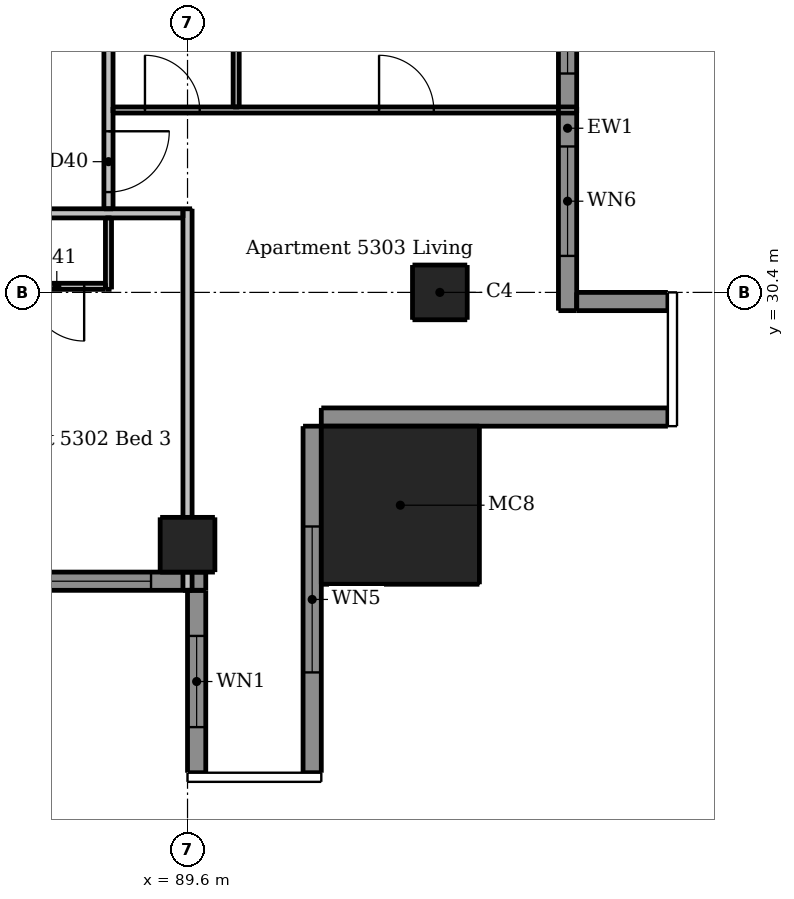
"""IFC4 building model, lengths in metres.
Left out: names, types, materials, properties, quantities, classifications, styles, units other than length and angle.
Written with IfcOpenShell. Run it as: python <this file> out.ifc"""

import sys

from ifc_helpers import new_model, si_unit, direction, frame, frame_2d, origin, origin_2d, place, context, subcontext, project, spatial, rectangle, extrude, element, fill, save


model = new_model("IFC4")
c1 = context("Model", 3, precision=1e-05, world=origin(), true_north=direction((0.0, 1.0)))
c2 = subcontext(c1, "Body", "Model", "MODEL_VIEW")
j1 = project(units=[si_unit("LENGTHUNIT", "METRE"), si_unit("PLANEANGLEUNIT", "RADIAN")], contexts=[c1])
p1 = place(None, origin())
s1 = spatial("IfcSite", under=j1, at=p1, CompositionType="ELEMENT")
p2 = place(p1, origin())
s2 = spatial("IfcBuilding", under=s1, at=p2, CompositionType="ELEMENT")
p3 = place(p2, frame((0.0, 0.0, 200.2)))
s3 = spatial("IfcBuildingStorey", under=s2, at=p3, CompositionType="ELEMENT", Elevation=200.2)
for number, where, z_axis, x_axis in (
    (1, (89.6, 26.25, 0.0), (0.0, 0.0, 1.0), (1.0, 0.0, 0.0)),
    (2, (93.75, 30.4, 0.0), (0.0, 0.0, 1.0), (1.0, 0.0, 0.0)),
):
    element("IfcColumn", number, at=place(p3, frame(where, z_axis=z_axis, x_axis=x_axis)), inside=s3, PredefinedType="COLUMN", context=c2, shape_type="SweptSolid", body=[
        extrude(rectangle(XDim=0.9, YDim=0.9, at=origin_2d()), origin(), (0.0, 0.0, 1.0), 3.05),
    ])
p4 = place(p3, frame((93.1, 26.9, 0.0), z_axis=(0.0, 0.0, 1.0), x_axis=(1.0, 0.0, 0.0)))
e3 = element("IfcColumn", 3, at=p4, inside=s3, PredefinedType="COLUMN", context=c2, shape_type="SweptSolid", body=[
    extrude(rectangle(XDim=2.6, YDim=2.6, at=origin_2d()), origin(), (0.0, 0.0, 1.0), 3.3),
])
p5 = place(p3, frame((89.75, 25.5, 0.0), z_axis=(0.0, 0.0, 1.0), x_axis=(0.0, -1.0, 0.0)))
e4 = element("IfcWall", 4, at=p5, inside=s3, PredefinedType="SOLIDWALL", context=c2, shape_type="SweptSolid", body=[
    extrude(rectangle(XDim=3.0, YDim=0.3, at=frame_2d((1.5, 0.0))), origin(), (0.0, 0.0, 1.0), 3.05),
])
p6 = place(p5, frame((0.75, 0.0, 0.9)))
e5 = element("IfcOpeningElement", 5, at=p6, cuts=e4, PredefinedType="OPENING", context=c2, shape_type="SweptSolid", body=[
    extrude(rectangle(XDim=1.5, YDim=1.5, at=frame_2d((0.75, 0.75))), frame((0.0, 0.16, 0.0), z_axis=(0.0, -1.0, 0.0), x_axis=(1.0, 0.0, 0.0)), (0.0, 0.0, 1.0), 0.32),
])
p7 = place(p3, frame((91.65, 22.5, 0.0), z_axis=(0.0, 0.0, 1.0), x_axis=(0.0, 1.0, 0.0)))
e6 = element("IfcWall", 6, at=p7, inside=s3, PredefinedType="SOLIDWALL", context=c2, shape_type="SweptSolid", body=[
    extrude(rectangle(XDim=5.7, YDim=0.3, at=frame_2d((2.85, 0.0))), origin(), (0.0, 0.0, 1.0), 3.05),
])
p8 = place(p7, frame((1.65, 0.0, 0.15)))
e7 = element("IfcOpeningElement", 7, at=p8, cuts=e6, PredefinedType="OPENING", context=c2, shape_type="SweptSolid", body=[
    extrude(rectangle(XDim=2.4, YDim=2.1, at=frame_2d((1.2, 1.05))), frame((0.0, 0.16, 0.0), z_axis=(0.0, -1.0, 0.0), x_axis=(1.0, 0.0, 0.0)), (0.0, 0.0, 1.0), 0.32),
])
p9 = place(p3, frame((91.8, 28.35, 0.0), z_axis=(0.0, 0.0, 1.0), x_axis=(1.0, 0.0, 0.0)))
e8 = element("IfcWall", 8, at=p9, inside=s3, PredefinedType="SOLIDWALL", context=c2, shape_type="SweptSolid", body=[
    extrude(rectangle(XDim=5.7, YDim=0.3, at=frame_2d((2.85, 0.0))), origin(), (0.0, 0.0, 1.0), 3.05),
])
p10 = place(p3, frame((97.5, 30.25, 0.0), z_axis=(0.0, 0.0, 1.0), x_axis=(-1.0, 0.0, 0.0)))
e9 = element("IfcWall", 9, at=p10, inside=s3, PredefinedType="SOLIDWALL", context=c2, shape_type="SweptSolid", body=[
    extrude(rectangle(XDim=1.5, YDim=0.3, at=frame_2d((0.75, 0.0))), origin(), (0.0, 0.0, 1.0), 3.05),
])
p11 = place(p3, frame((83.6, 25.65, 0.0), z_axis=(0.0, 0.0, 1.0), x_axis=(1.0, 0.0, 0.0)))
e10 = element("IfcWall", 10, at=p11, inside=s3, PredefinedType="SOLIDWALL", context=c2, shape_type="SweptSolid", body=[
    extrude(rectangle(XDim=6.3, YDim=0.3, at=frame_2d((3.15, 0.0))), origin(), (0.0, 0.0, 1.0), 3.05),
])
p12 = place(p11, frame((0.6, 0.0, 0.15)))
e11 = element("IfcOpeningElement", 11, at=p12, cuts=e10, PredefinedType="OPENING", context=c2, shape_type="SweptSolid", body=[
    extrude(rectangle(XDim=1.8, YDim=2.1, at=frame_2d((0.9, 1.05))), frame((0.0, 0.16, 0.0), z_axis=(0.0, -1.0, 0.0), x_axis=(1.0, 0.0, 0.0)), (0.0, 0.0, 1.0), 0.32),
])
p13 = place(p11, frame((3.6, 0.0, 0.15)))
e12 = element("IfcOpeningElement", 12, at=p13, cuts=e10, PredefinedType="OPENING", context=c2, shape_type="SweptSolid", body=[
    extrude(rectangle(XDim=1.8, YDim=2.1, at=frame_2d((0.9, 1.05))), frame((0.0, 0.16, 0.0), z_axis=(0.0, -1.0, 0.0), x_axis=(1.0, 0.0, 0.0)), (0.0, 0.0, 1.0), 0.32),
])
p14 = place(p3, frame((95.85, 30.1, 0.0), z_axis=(0.0, 0.0, 1.0), x_axis=(0.0, 1.0, 0.0)))
e13 = element("IfcWall", 13, at=p14, inside=s3, PredefinedType="SOLIDWALL", context=c2, shape_type="SweptSolid", body=[
    extrude(rectangle(XDim=6.0, YDim=0.3, at=frame_2d((3.0, 0.0))), origin(), (0.0, 0.0, 1.0), 3.05),
])
p15 = place(p14, frame((0.9, 0.0, 0.15)))
e14 = element("IfcOpeningElement", 14, at=p15, cuts=e13, PredefinedType="OPENING", context=c2, shape_type="SweptSolid", body=[
    extrude(rectangle(XDim=1.8, YDim=2.1, at=frame_2d((0.9, 1.05))), frame((0.0, 0.16, 0.0), z_axis=(0.0, -1.0, 0.0), x_axis=(1.0, 0.0, 0.0)), (0.0, 0.0, 1.0), 0.32),
])
p16 = place(p14, frame((3.9, 0.0, 0.15)))
e15 = element("IfcOpeningElement", 15, at=p16, cuts=e13, PredefinedType="OPENING", context=c2, shape_type="SweptSolid", body=[
    extrude(rectangle(XDim=1.8, YDim=2.1, at=frame_2d((0.9, 1.05))), frame((0.0, 0.16, 0.0), z_axis=(0.0, -1.0, 0.0), x_axis=(1.0, 0.0, 0.0)), (0.0, 0.0, 1.0), 0.32),
])
p17 = place(p3, frame((88.3, 30.45, 0.0), z_axis=(0.0, 0.0, 1.0), x_axis=(0.0, 1.0, 0.0)))
e16 = element("IfcWall", 16, at=p17, inside=s3, PredefinedType="PARTITIONING", context=c2, shape_type="SweptSolid", body=[
    extrude(rectangle(XDim=1.175, YDim=0.1, at=frame_2d((0.587, 0.0))), origin(), (0.0, 0.0, 1.0), 3.05),
])
p18 = place(p3, frame((90.4, 33.45, 0.0), z_axis=(0.0, 0.0, 1.0), x_axis=(0.0, 1.0, 0.0)))
e17 = element("IfcWall", 17, at=p18, inside=s3, PredefinedType="PARTITIONING", context=c2, shape_type="SweptSolid", body=[
    extrude(rectangle(XDim=5.875, YDim=0.1, at=frame_2d((2.938, 0.0))), origin(), (0.0, 0.0, 1.0), 3.05),
])
p19 = place(p18, frame((3.75, 0.0, 0.0)))
e18 = element("IfcOpeningElement", 18, at=p19, cuts=e17, PredefinedType="OPENING", context=c2, shape_type="SweptSolid", body=[
    extrude(rectangle(XDim=0.8, YDim=2.1, at=frame_2d((0.4, 1.05))), frame((0.0, 0.06, 0.0), z_axis=(0.0, -1.0, 0.0), x_axis=(1.0, 0.0, 0.0)), (0.0, 0.0, 1.0), 0.12),
])
p20 = place(p3, frame((88.375, 33.4, 0.0), z_axis=(0.0, 0.0, 1.0), x_axis=(1.0, 0.0, 0.0)))
e19 = element("IfcWall", 19, at=p20, inside=s3, PredefinedType="PARTITIONING", context=c2, shape_type="SweptSolid", body=[
    extrude(rectangle(XDim=7.625, YDim=0.1, at=frame_2d((3.812, 0.0))), origin(), (0.0, 0.0, 1.0), 3.05),
])
p21 = place(p20, frame((0.525, 0.0, 0.0)))
e20 = element("IfcOpeningElement", 20, at=p21, cuts=e19, PredefinedType="OPENING", context=c2, shape_type="SweptSolid", body=[
    extrude(rectangle(XDim=0.9, YDim=2.1, at=frame_2d((0.45, 1.05))), frame((0.0, 0.06, 0.0), z_axis=(0.0, -1.0, 0.0), x_axis=(1.0, 0.0, 0.0)), (0.0, 0.0, 1.0), 0.12),
])
p22 = place(p20, frame((4.375, 0.0, 0.0)))
e21 = element("IfcOpeningElement", 21, at=p22, cuts=e19, PredefinedType="OPENING", context=c2, shape_type="SweptSolid", body=[
    extrude(rectangle(XDim=0.9, YDim=2.1, at=frame_2d((0.45, 1.05))), frame((0.0, 0.06, 0.0), z_axis=(0.0, -1.0, 0.0), x_axis=(1.0, 0.0, 0.0)), (0.0, 0.0, 1.0), 0.12),
])
p23 = place(p3, frame((88.25, 30.5, 0.0), z_axis=(0.0, 0.0, 1.0), x_axis=(-1.0, 0.0, 0.0)))
e22 = element("IfcWall", 22, at=p23, inside=s3, PredefinedType="PARTITIONING", context=c2, shape_type="SweptSolid", body=[
    extrude(rectangle(XDim=16.575, YDim=0.1, at=frame_2d((8.288, 0.0))), origin(), (0.0, 0.0, 1.0), 3.05),
])
p24 = place(p23, frame((15.3, 0.0, 0.0)))
e23 = element("IfcOpeningElement", 23, at=p24, cuts=e22, PredefinedType="OPENING", context=c2, shape_type="SweptSolid", body=[
    extrude(rectangle(XDim=0.9, YDim=2.1, at=frame_2d((0.45, 1.05))), frame((0.0, 0.06, 0.0), z_axis=(0.0, -1.0, 0.0), x_axis=(1.0, 0.0, 0.0)), (0.0, 0.0, 1.0), 0.12),
])
p25 = place(p23, frame((11.4, 0.0, 0.0)))
e24 = element("IfcOpeningElement", 24, at=p25, cuts=e22, PredefinedType="OPENING", context=c2, shape_type="SweptSolid", body=[
    extrude(rectangle(XDim=0.9, YDim=2.1, at=frame_2d((0.45, 1.05))), frame((0.0, 0.06, 0.0), z_axis=(0.0, -1.0, 0.0), x_axis=(1.0, 0.0, 0.0)), (0.0, 0.0, 1.0), 0.12),
])
p26 = place(p23, frame((13.5, 0.0, 0.0)))
e25 = element("IfcOpeningElement", 25, at=p26, cuts=e22, PredefinedType="OPENING", context=c2, shape_type="SweptSolid", body=[
    extrude(rectangle(XDim=0.9, YDim=2.1, at=frame_2d((0.45, 1.05))), frame((0.0, 0.06, 0.0), z_axis=(0.0, -1.0, 0.0), x_axis=(1.0, 0.0, 0.0)), (0.0, 0.0, 1.0), 0.12),
])
p27 = place(p23, frame((8.7, 0.0, 0.0)))
e26 = element("IfcOpeningElement", 26, at=p27, cuts=e22, PredefinedType="OPENING", context=c2, shape_type="SweptSolid", body=[
    extrude(rectangle(XDim=0.9, YDim=2.1, at=frame_2d((0.45, 1.05))), frame((0.0, 0.06, 0.0), z_axis=(0.0, -1.0, 0.0), x_axis=(1.0, 0.0, 0.0)), (0.0, 0.0, 1.0), 0.12),
])
p28 = place(p23, frame((3.0, 0.0, 0.0)))
e27 = element("IfcOpeningElement", 27, at=p28, cuts=e22, PredefinedType="OPENING", context=c2, shape_type="SweptSolid", body=[
    extrude(rectangle(XDim=0.9, YDim=2.1, at=frame_2d((0.45, 1.05))), frame((0.0, 0.06, 0.0), z_axis=(0.0, -1.0, 0.0), x_axis=(1.0, 0.0, 0.0)), (0.0, 0.0, 1.0), 0.12),
])
p29 = place(p23, frame((0.35, 0.0, 0.0)))
e28 = element("IfcOpeningElement", 28, at=p29, cuts=e22, PredefinedType="OPENING", context=c2, shape_type="SweptSolid", body=[
    extrude(rectangle(XDim=0.9, YDim=2.1, at=frame_2d((0.45, 1.05))), frame((0.0, 0.06, 0.0), z_axis=(0.0, -1.0, 0.0), x_axis=(1.0, 0.0, 0.0)), (0.0, 0.0, 1.0), 0.12),
])
p30 = place(p23, frame((6.05, 0.0, 0.0)))
e29 = element("IfcOpeningElement", 29, at=p30, cuts=e22, PredefinedType="OPENING", context=c2, shape_type="SweptSolid", body=[
    extrude(rectangle(XDim=0.8, YDim=2.1, at=frame_2d((0.4, 1.05))), frame((0.0, 0.06, 0.0), z_axis=(0.0, -1.0, 0.0), x_axis=(1.0, 0.0, 0.0)), (0.0, 0.0, 1.0), 0.12),
])
p31 = place(p3, frame((88.3, 61.175, 0.0), z_axis=(0.0, 0.0, 1.0), x_axis=(0.0, -1.0, 0.0)))
e30 = element("IfcWall", 30, at=p31, inside=s3, PredefinedType="PARTITIONING", context=c2, shape_type="SweptSolid", body=[
    extrude(rectangle(XDim=29.4, YDim=0.15, at=frame_2d((14.7, 0.0))), origin(), (0.0, 0.0, 1.0), 3.05),
])
p32 = place(p31, frame((28.125, 0.0, 0.0)))
e31 = element("IfcOpeningElement", 31, at=p32, cuts=e30, PredefinedType="OPENING", context=c2, shape_type="SweptSolid", body=[
    extrude(rectangle(XDim=1.0, YDim=2.1, at=frame_2d((0.5, 1.05))), frame((0.0, 0.085, 0.0), z_axis=(0.0, -1.0, 0.0), x_axis=(1.0, 0.0, 0.0)), (0.0, 0.0, 1.0), 0.17),
])
p33 = place(p31, frame((10.775, 0.0, 0.0)))
e32 = element("IfcOpeningElement", 32, at=p33, cuts=e30, PredefinedType="OPENING", context=c2, shape_type="SweptSolid", body=[
    extrude(rectangle(XDim=1.0, YDim=2.1, at=frame_2d((0.5, 1.05))), frame((0.0, 0.085, 0.0), z_axis=(0.0, -1.0, 0.0), x_axis=(1.0, 0.0, 0.0)), (0.0, 0.0, 1.0), 0.17),
])
p34 = place(p3, frame((89.6, 25.5, 0.0), z_axis=(0.0, 0.0, 1.0), x_axis=(0.0, 1.0, 0.0)))
e33 = element("IfcWall", 33, at=p34, inside=s3, PredefinedType="PARTITIONING", context=c2, shape_type="SweptSolid", body=[
    extrude(rectangle(XDim=6.275, YDim=0.15, at=frame_2d((3.137, 0.0))), origin(), (0.0, 0.0, 1.0), 2.516),
])
p35 = place(p3, frame((89.525, 31.7, 0.0), z_axis=(0.0, 0.0, 1.0), x_axis=(-1.0, 0.0, 0.0)))
e34 = element("IfcWall", 34, at=p35, inside=s3, PredefinedType="PARTITIONING", context=c2, shape_type="SweptSolid", body=[
    extrude(rectangle(XDim=30.55, YDim=0.15, at=frame_2d((15.275, 0.0))), origin(), (0.0, 0.0, 1.0), 3.05),
])
p36 = place(p35, frame((26.775, 0.0, 0.0)))
e35 = element("IfcOpeningElement", 35, at=p36, cuts=e34, PredefinedType="OPENING", context=c2, shape_type="SweptSolid", body=[
    extrude(rectangle(XDim=1.0, YDim=2.1, at=frame_2d((0.5, 1.05))), frame((0.0, 0.085, 0.0), z_axis=(0.0, -1.0, 0.0), x_axis=(1.0, 0.0, 0.0)), (0.0, 0.0, 1.0), 0.17),
])
p37 = place(p35, frame((9.075, 0.0, 0.0)))
e36 = element("IfcOpeningElement", 36, at=p37, cuts=e34, PredefinedType="OPENING", context=c2, shape_type="SweptSolid", body=[
    extrude(rectangle(XDim=1.0, YDim=2.1, at=frame_2d((0.5, 1.05))), frame((0.0, 0.085, 0.0), z_axis=(0.0, -1.0, 0.0), x_axis=(1.0, 0.0, 0.0)), (0.0, 0.0, 1.0), 0.17),
])
p38 = place(p6, origin())
e37 = element("IfcWindow", 37, at=p38, inside=s3, PartitioningType="DOUBLE_PANEL_VERTICAL", PredefinedType="WINDOW", context=c2, shape_type="SweptSolid", body=[
    extrude(rectangle(XDim=1.5, YDim=1.5, at=frame_2d((0.75, 0.75))), frame((0.0, 0.03, 0.0), z_axis=(0.0, -1.0, 0.0), x_axis=(1.0, 0.0, 0.0)), (0.0, 0.0, 1.0), 0.06),
])
fill(e5, e37)
p39 = place(p8, origin())
e38 = element("IfcWindow", 38, at=p39, inside=s3, PartitioningType="DOUBLE_PANEL_VERTICAL", PredefinedType="WINDOW", context=c2, shape_type="SweptSolid", body=[
    extrude(rectangle(XDim=2.4, YDim=2.1, at=frame_2d((1.2, 1.05))), frame((0.0, 0.03, 0.0), z_axis=(0.0, -1.0, 0.0), x_axis=(1.0, 0.0, 0.0)), (0.0, 0.0, 1.0), 0.06),
])
fill(e7, e38)
p40 = place(p13, origin())
e39 = element("IfcWindow", 39, at=p40, inside=s3, PartitioningType="DOUBLE_PANEL_VERTICAL", PredefinedType="WINDOW", context=c2, shape_type="SweptSolid", body=[
    extrude(rectangle(XDim=1.8, YDim=2.1, at=frame_2d((0.9, 1.05))), frame((0.0, 0.03, 0.0), z_axis=(0.0, -1.0, 0.0), x_axis=(1.0, 0.0, 0.0)), (0.0, 0.0, 1.0), 0.06),
])
fill(e12, e39)
p41 = place(p15, origin())
e40 = element("IfcWindow", 40, at=p41, inside=s3, PartitioningType="DOUBLE_PANEL_VERTICAL", PredefinedType="WINDOW", context=c2, shape_type="SweptSolid", body=[
    extrude(rectangle(XDim=1.8, YDim=2.1, at=frame_2d((0.9, 1.05))), frame((0.0, 0.03, 0.0), z_axis=(0.0, -1.0, 0.0), x_axis=(1.0, 0.0, 0.0)), (0.0, 0.0, 1.0), 0.06),
])
fill(e14, e40)
p42 = place(p16, origin())
e41 = element("IfcWindow", 41, at=p42, inside=s3, PartitioningType="DOUBLE_PANEL_VERTICAL", PredefinedType="WINDOW", context=c2, shape_type="SweptSolid", body=[
    extrude(rectangle(XDim=1.8, YDim=2.1, at=frame_2d((0.9, 1.05))), frame((0.0, 0.03, 0.0), z_axis=(0.0, -1.0, 0.0), x_axis=(1.0, 0.0, 0.0)), (0.0, 0.0, 1.0), 0.06),
])
fill(e15, e41)
p43 = place(p29, origin())
e42 = element("IfcDoor", 42, at=p43, inside=s3, OperationType="SINGLE_SWING_LEFT", PredefinedType="DOOR", context=c2, shape_type="SweptSolid", body=[
    extrude(rectangle(XDim=0.9, YDim=2.1, at=frame_2d((0.45, 1.05))), frame((0.0, 0.025, 0.0), z_axis=(0.0, -1.0, 0.0), x_axis=(1.0, 0.0, 0.0)), (0.0, 0.0, 1.0), 0.05),
])
fill(e28, e42)
p44 = place(p32, origin())
e43 = element("IfcDoor", 43, at=p44, inside=s3, OperationType="SINGLE_SWING_LEFT", PredefinedType="DOOR", context=c2, shape_type="SweptSolid", body=[
    extrude(rectangle(XDim=1.0, YDim=2.1, at=frame_2d((0.5, 1.05))), frame((0.0, 0.025, 0.0), z_axis=(0.0, -1.0, 0.0), x_axis=(1.0, 0.0, 0.0)), (0.0, 0.0, 1.0), 0.05),
])
fill(e31, e43)
p45 = place(p21, origin())
e44 = element("IfcDoor", 44, at=p45, inside=s3, OperationType="SINGLE_SWING_LEFT", PredefinedType="DOOR", context=c2, shape_type="SweptSolid", body=[
    extrude(rectangle(XDim=0.9, YDim=2.1, at=frame_2d((0.45, 1.05))), frame((0.0, 0.025, 0.0), z_axis=(0.0, -1.0, 0.0), x_axis=(1.0, 0.0, 0.0)), (0.0, 0.0, 1.0), 0.05),
])
fill(e20, e44)
p46 = place(p22, origin())
e45 = element("IfcDoor", 45, at=p46, inside=s3, OperationType="SINGLE_SWING_LEFT", PredefinedType="DOOR", context=c2, shape_type="SweptSolid", body=[
    extrude(rectangle(XDim=0.9, YDim=2.1, at=frame_2d((0.45, 1.05))), frame((0.0, 0.025, 0.0), z_axis=(0.0, -1.0, 0.0), x_axis=(1.0, 0.0, 0.0)), (0.0, 0.0, 1.0), 0.05),
])
fill(e21, e45)
save(model, sys.argv[1])
